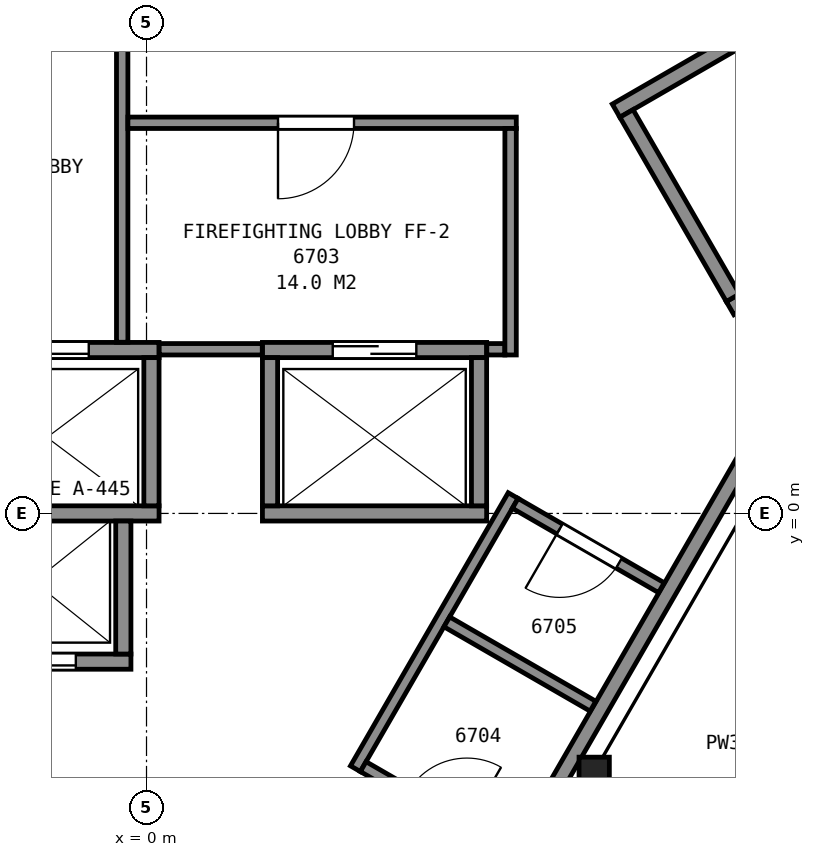
"""IFC4 building model, lengths in metres.
Left out: names, types, materials, properties, quantities, classifications, styles, units other than length and angle.
Written with IfcOpenShell. Run it as: python <this file> out.ifc"""

import sys

from ifc_helpers import new_model, si_unit, direction, frame, frame_2d, origin, origin_2d, place, context, subcontext, project, spatial, rectangle, i_section, extrude, element, fill, save


model = new_model("IFC4")
c1 = context("Model", 3, precision=1e-05, world=origin(), true_north=direction((0.0, 1.0)))
c2 = subcontext(c1, "Body", "Model", "MODEL_VIEW")
j1 = project(units=[si_unit("LENGTHUNIT", "METRE"), si_unit("PLANEANGLEUNIT", "RADIAN")], contexts=[c1])
p1 = place(None, origin())
s1 = spatial("IfcSite", under=j1, at=p1, CompositionType="ELEMENT")
p2 = place(p1, origin())
s2 = spatial("IfcBuilding", under=s1, at=p2, CompositionType="ELEMENT")
p3 = place(p2, frame((0.0, 0.0, 267.7)))
s3 = spatial("IfcBuildingStorey", under=s2, at=p3, CompositionType="ELEMENT", Elevation=267.7)
p4 = place(p3, frame((5.89, -3.4, 0.0), z_axis=(0.0, 0.0, 1.0), x_axis=(1.0, 0.0, 0.0)))
e1 = element("IfcColumn", 1, at=p4, inside=s3, PredefinedType="COLUMN", context=c2, shape_type="SweptSolid", body=[
    extrude(i_section(OverallWidth=0.399, OverallDepth=0.386, WebThickness=0.021, FlangeThickness=0.033, FilletRadius=0.015, at=origin_2d()), origin(), (0.0, 0.0, 1.0), 3.7),
])
for number, where, z_axis, x_axis in (
    (2, (6.178, 5.299, 0.0), (0.0, 0.0, 1.0), (0.866, 0.5, 0.0)),
    (3, (7.678, 2.701, 0.0), (0.0, 0.0, 1.0), (0.866, 0.5, 0.0)),
):
    element("IfcWall", number, at=place(p3, frame(where, z_axis=z_axis, x_axis=x_axis)), inside=s3, PredefinedType="PARTITIONING", context=c2, shape_type="SweptSolid", body=[
        extrude(rectangle(XDim=7.2, YDim=0.2, at=frame_2d((3.6, 0.0))), origin(), (0.0, 0.0, 1.0), 3.45),
    ])
p5 = place(p3, frame((7.715, 2.838, 0.0), z_axis=(0.0, 0.0, 1.0), x_axis=(-0.500049511043, 0.865996816683, 0.0)))
e4 = element("IfcWall", 4, at=p5, inside=s3, PredefinedType="PARTITIONING", context=c2, shape_type="SweptSolid", body=[
    extrude(rectangle(XDim=2.8, YDim=0.2, at=frame_2d((1.4, 0.0))), origin(), (0.0, 0.0, 1.0), 3.45),
])
p6 = place(p3, frame((-2.755, -1.95, 0.0), z_axis=(0.0, 0.0, 1.0), x_axis=(1.0, 0.0, 0.0)))
e5 = element("IfcWall", 5, at=p6, inside=s3, PredefinedType="PARTITIONING", context=c2, shape_type="SweptSolid", body=[
    extrude(rectangle(XDim=2.55, YDim=0.2, at=frame_2d((1.275, 0.0))), origin(), (0.0, 0.0, 1.0), 3.7),
])
p7 = place(p6, frame((0.725, 0.0, 0.0)))
e6 = element("IfcOpeningElement", 6, at=p7, cuts=e5, PredefinedType="OPENING", context=c2, shape_type="SweptSolid", body=[
    extrude(rectangle(XDim=1.1, YDim=2.1, at=frame_2d((0.55, 1.05))), frame((0.0, 0.11, 0.0), z_axis=(0.0, -1.0, 0.0), x_axis=(1.0, 0.0, 0.0)), (0.0, 0.0, 1.0), 0.22),
])
p8 = place(p3, frame((-2.785, 0.0, 0.0), z_axis=(0.0, 0.0, 1.0), x_axis=(1.0, 0.0, 0.0)))
e7 = element("IfcWall", 7, at=p8, inside=s3, PredefinedType="PARTITIONING", context=c2, shape_type="SweptSolid", body=[
    extrude(rectangle(XDim=2.95, YDim=0.2, at=frame_2d((1.475, 0.0))), origin(), (0.0, 0.0, 1.0), 3.7),
])
p9 = place(p3, frame((1.525, 0.0, 0.0), z_axis=(0.0, 0.0, 1.0), x_axis=(1.0, 0.0, 0.0)))
e8 = element("IfcWall", 8, at=p9, inside=s3, PredefinedType="PARTITIONING", context=c2, shape_type="SweptSolid", body=[
    extrude(rectangle(XDim=2.95, YDim=0.2, at=frame_2d((1.475, 0.0))), origin(), (0.0, 0.0, 1.0), 3.7),
])
p10 = place(p3, frame((-2.785, 2.15, 0.0), z_axis=(0.0, 0.0, 1.0), x_axis=(1.0, 0.0, 0.0)))
e9 = element("IfcWall", 9, at=p10, inside=s3, PredefinedType="PARTITIONING", context=c2, shape_type="SweptSolid", body=[
    extrude(rectangle(XDim=2.95, YDim=0.2, at=frame_2d((1.475, 0.0))), origin(), (0.0, 0.0, 1.0), 3.7),
])
p11 = place(p10, frame((0.925, 0.0, 0.0)))
e10 = element("IfcOpeningElement", 10, at=p11, cuts=e9, PredefinedType="OPENING", context=c2, shape_type="SweptSolid", body=[
    extrude(rectangle(XDim=1.1, YDim=2.1, at=frame_2d((0.55, 1.05))), frame((0.0, 0.11, 0.0), z_axis=(0.0, -1.0, 0.0), x_axis=(1.0, 0.0, 0.0)), (0.0, 0.0, 1.0), 0.22),
])
p12 = place(p3, frame((1.525, 2.15, 0.0), z_axis=(0.0, 0.0, 1.0), x_axis=(1.0, 0.0, 0.0)))
e11 = element("IfcWall", 11, at=p12, inside=s3, PredefinedType="PARTITIONING", context=c2, shape_type="SweptSolid", body=[
    extrude(rectangle(XDim=2.95, YDim=0.2, at=frame_2d((1.475, 0.0))), origin(), (0.0, 0.0, 1.0), 3.7),
])
p13 = place(p12, frame((0.925, 0.0, 0.0)))
e12 = element("IfcOpeningElement", 12, at=p13, cuts=e11, PredefinedType="OPENING", context=c2, shape_type="SweptSolid", body=[
    extrude(rectangle(XDim=1.1, YDim=2.1, at=frame_2d((0.55, 1.05))), frame((0.0, 0.11, 0.0), z_axis=(0.0, -1.0, 0.0), x_axis=(1.0, 0.0, 0.0)), (0.0, 0.0, 1.0), 0.22),
])
for number, where, z_axis, x_axis in (
    (13, (4.375, 0.1, 0.0), (0.0, 0.0, 1.0), (0.0, 1.0, 0.0)),
    (14, (1.625, 0.1, 0.0), (0.0, 0.0, 1.0), (0.0, 1.0, 0.0)),
    (15, (0.065, 0.1, 0.0), (0.0, 0.0, 1.0), (0.0, 1.0, 0.0)),
):
    element("IfcWall", number, at=place(p3, frame(where, z_axis=z_axis, x_axis=x_axis)), inside=s3, PredefinedType="PARTITIONING", context=c2, shape_type="SweptSolid", body=[
        extrude(rectangle(XDim=1.95, YDim=0.2, at=frame_2d((0.975, 0.0))), origin(), (0.0, 0.0, 1.0), 3.7),
    ])
p14 = place(p3, frame((-0.305, -1.85, 0.0), z_axis=(0.0, 0.0, 1.0), x_axis=(0.0, 1.0, 0.0)))
e16 = element("IfcWall", 16, at=p14, inside=s3, PredefinedType="PARTITIONING", context=c2, shape_type="SweptSolid", body=[
    extrude(rectangle(XDim=1.75, YDim=0.2, at=frame_2d((0.875, 0.0))), origin(), (0.0, 0.0, 1.0), 3.7),
])
p15 = place(p3, frame((-0.32, 2.252, 0.0), z_axis=(0.0, 0.0, 1.0), x_axis=(0.0, 1.0, 0.0)))
e17 = element("IfcWall", 17, at=p15, inside=s3, PredefinedType="PARTITIONING", context=c2, shape_type="SweptSolid", body=[
    extrude(rectangle(XDim=4.063, YDim=0.15, at=frame_2d((2.031, 0.0))), origin(), (0.0, 0.0, 1.0), 3.45),
])
p16 = place(p3, frame((-0.245, 5.14, 0.0), z_axis=(0.0, 0.0, 1.0), x_axis=(1.0, 0.0, 0.0)))
e18 = element("IfcWall", 18, at=p16, inside=s3, PredefinedType="PARTITIONING", context=c2, shape_type="SweptSolid", body=[
    extrude(rectangle(XDim=5.11, YDim=0.15, at=frame_2d((2.555, 0.0))), origin(), (0.0, 0.0, 1.0), 3.45),
])
p17 = place(p16, frame((1.975, 0.0, 0.0)))
e19 = element("IfcOpeningElement", 19, at=p17, cuts=e18, PredefinedType="OPENING", context=c2, shape_type="SweptSolid", body=[
    extrude(rectangle(XDim=1.0, YDim=2.1, at=frame_2d((0.5, 1.05))), frame((0.0, 0.085, 0.0), z_axis=(0.0, -1.0, 0.0), x_axis=(1.0, 0.0, 0.0)), (0.0, 0.0, 1.0), 0.17),
])
p18 = place(p3, frame((0.167, 2.16, 0.0), z_axis=(0.0, 0.0, 1.0), x_axis=(1.0, 0.0, 0.0)))
e20 = element("IfcWall", 20, at=p18, inside=s3, PredefinedType="PARTITIONING", context=c2, shape_type="SweptSolid", body=[
    extrude(rectangle(XDim=1.356, YDim=0.15, at=frame_2d((0.678, 0.0))), origin(), (0.0, 0.0, 1.0), 3.45),
])
p19 = place(p3, frame((2.749, -3.359, 0.0), z_axis=(0.0, 0.0, 1.0), x_axis=(0.500017827812, 0.866015110648, 0.0)))
e21 = element("IfcWall", 21, at=p19, inside=s3, PredefinedType="PARTITIONING", context=c2, shape_type="SweptSolid", body=[
    extrude(rectangle(XDim=4.15, YDim=0.15, at=frame_2d((2.075, 0.0))), origin(), (0.0, 0.0, 1.0), 3.45),
])
p20 = place(p3, frame((2.851, -3.332, 0.0), z_axis=(0.0, 0.0, 1.0), x_axis=(0.866110524189, -0.499852538144, 0.0)))
e22 = element("IfcWall", 22, at=p20, inside=s3, PredefinedType="PARTITIONING", context=c2, shape_type="SweptSolid", body=[
    extrude(rectangle(XDim=2.22, YDim=0.15, at=frame_2d((1.11, 0.0))), origin(), (0.0, 0.0, 1.0), 3.45),
])
p21 = place(p20, frame((0.675, 0.0, 0.0)))
e23 = element("IfcOpeningElement", 23, at=p21, cuts=e22, PredefinedType="OPENING", context=c2, shape_type="SweptSolid", body=[
    extrude(rectangle(XDim=0.9, YDim=2.1, at=frame_2d((0.45, 1.05))), frame((0.0, 0.085, 0.0), z_axis=(0.0, -1.0, 0.0), x_axis=(1.0, 0.0, 0.0)), (0.0, 0.0, 1.0), 0.17),
])
p22 = place(p3, frame((3.828, -6.29, 0.0), z_axis=(0.0, 0.0, 1.0), x_axis=(0.499979739078, 0.866037101117, 0.0)))
e24 = element("IfcWall", 24, at=p22, inside=s3, PredefinedType="PARTITIONING", context=c2, shape_type="SweptSolid", body=[
    extrude(rectangle(XDim=11.363, YDim=0.2, at=frame_2d((5.681, 0.0))), origin(), (0.0, 0.0, 1.0), 3.45),
])
p23 = place(p22, frame((0.55, 0.0, 0.0)))
e25 = element("IfcOpeningElement", 25, at=p23, cuts=e24, PredefinedType="OPENING", context=c2, shape_type="SweptSolid", body=[
    extrude(rectangle(XDim=1.2, YDim=2.1, at=frame_2d((0.6, 1.05))), frame((0.0, 0.11, 0.0), z_axis=(0.0, -1.0, 0.0), x_axis=(1.0, 0.0, 0.0)), (0.0, 0.0, 1.0), 0.22),
])
p24 = place(p3, frame((3.951, -1.427, 0.0), z_axis=(0.0, 0.0, 1.0), x_axis=(0.866062920605, -0.499935013329, 0.0)))
e26 = element("IfcWall", 26, at=p24, inside=s3, PredefinedType="PARTITIONING", context=c2, shape_type="SweptSolid", body=[
    extrude(rectangle(XDim=2.22, YDim=0.15, at=frame_2d((1.11, 0.0))), origin(), (0.0, 0.0, 1.0), 3.45),
])
p25 = place(p3, frame((4.477, 2.16, 0.0), z_axis=(0.0, 0.0, 1.0), x_axis=(1.0, 0.0, 0.0)))
e27 = element("IfcWall", 27, at=p25, inside=s3, PredefinedType="PARTITIONING", context=c2, shape_type="SweptSolid", body=[
    extrude(rectangle(XDim=0.238, YDim=0.15, at=frame_2d((0.119, 0.0))), origin(), (0.0, 0.0, 1.0), 3.45),
])
p26 = place(p3, frame((6.774, -0.978, 0.0), z_axis=(0.0, 0.0, 1.0), x_axis=(-0.866062920605, 0.499935013329, 0.0)))
e28 = element("IfcWall", 28, at=p26, inside=s3, PredefinedType="PARTITIONING", context=c2, shape_type="SweptSolid", body=[
    extrude(rectangle(XDim=2.22, YDim=0.15, at=frame_2d((1.11, 0.0))), origin(), (0.0, 0.0, 1.0), 3.45),
])
p27 = place(p26, frame((0.646, 0.0, 0.0)))
e29 = element("IfcOpeningElement", 29, at=p27, cuts=e28, PredefinedType="OPENING", context=c2, shape_type="SweptSolid", body=[
    extrude(rectangle(XDim=0.9, YDim=2.1, at=frame_2d((0.45, 1.05))), frame((0.0, 0.085, 0.0), z_axis=(0.0, -1.0, 0.0), x_axis=(1.0, 0.0, 0.0)), (0.0, 0.0, 1.0), 0.17),
])
p28 = place(p3, frame((4.79, 2.085, 0.0), z_axis=(0.0, 0.0, 1.0), x_axis=(0.0, 1.0, 0.0)))
e30 = element("IfcWall", 30, at=p28, inside=s3, PredefinedType="PARTITIONING", context=c2, shape_type="SweptSolid", body=[
    extrude(rectangle(XDim=2.98, YDim=0.15, at=frame_2d((1.49, 0.0))), origin(), (0.0, 0.0, 1.0), 3.45),
])
p29 = place(p7, origin())
e31 = element("IfcDoor", 31, at=p29, inside=s3, OperationType="SLIDING_TO_RIGHT", PredefinedType="DOOR", context=c2, shape_type="SweptSolid", body=[
    extrude(rectangle(XDim=1.1, YDim=2.1, at=frame_2d((0.55, 1.05))), frame((0.0, 0.025, 0.0), z_axis=(0.0, -1.0, 0.0), x_axis=(1.0, 0.0, 0.0)), (0.0, 0.0, 1.0), 0.05),
])
fill(e6, e31)
p30 = place(p11, origin())
e32 = element("IfcDoor", 32, at=p30, inside=s3, OperationType="SLIDING_TO_LEFT", PredefinedType="DOOR", context=c2, shape_type="SweptSolid", body=[
    extrude(rectangle(XDim=1.1, YDim=2.1, at=frame_2d((0.55, 1.05))), frame((0.0, 0.025, 0.0), z_axis=(0.0, -1.0, 0.0), x_axis=(1.0, 0.0, 0.0)), (0.0, 0.0, 1.0), 0.05),
])
fill(e10, e32)
p31 = place(p13, origin())
e33 = element("IfcDoor", 33, at=p31, inside=s3, OperationType="SLIDING_TO_RIGHT", PredefinedType="DOOR", context=c2, shape_type="SweptSolid", body=[
    extrude(rectangle(XDim=1.1, YDim=2.1, at=frame_2d((0.55, 1.05))), frame((0.0, 0.025, 0.0), z_axis=(0.0, -1.0, 0.0), x_axis=(1.0, 0.0, 0.0)), (0.0, 0.0, 1.0), 0.05),
])
fill(e12, e33)
p32 = place(p17, origin())
e34 = element("IfcDoor", 34, at=p32, inside=s3, OperationType="SINGLE_SWING_LEFT", PredefinedType="DOOR", context=c2, shape_type="SweptSolid", body=[
    extrude(rectangle(XDim=1.0, YDim=2.1, at=frame_2d((0.5, 1.05))), frame((0.0, 0.025, 0.0), z_axis=(0.0, -1.0, 0.0), x_axis=(1.0, 0.0, 0.0)), (0.0, 0.0, 1.0), 0.05),
])
fill(e19, e34)
p33 = place(p27, origin())
e35 = element("IfcDoor", 35, at=p33, inside=s3, OperationType="SINGLE_SWING_RIGHT", PredefinedType="DOOR", context=c2, shape_type="SweptSolid", body=[
    extrude(rectangle(XDim=0.9, YDim=2.1, at=frame_2d((0.45, 1.05))), frame((0.0, 0.025, 0.0), z_axis=(0.0, -1.0, 0.0), x_axis=(1.0, 0.0, 0.0)), (0.0, 0.0, 1.0), 0.05),
])
fill(e29, e35)
save(model, sys.argv[1])
